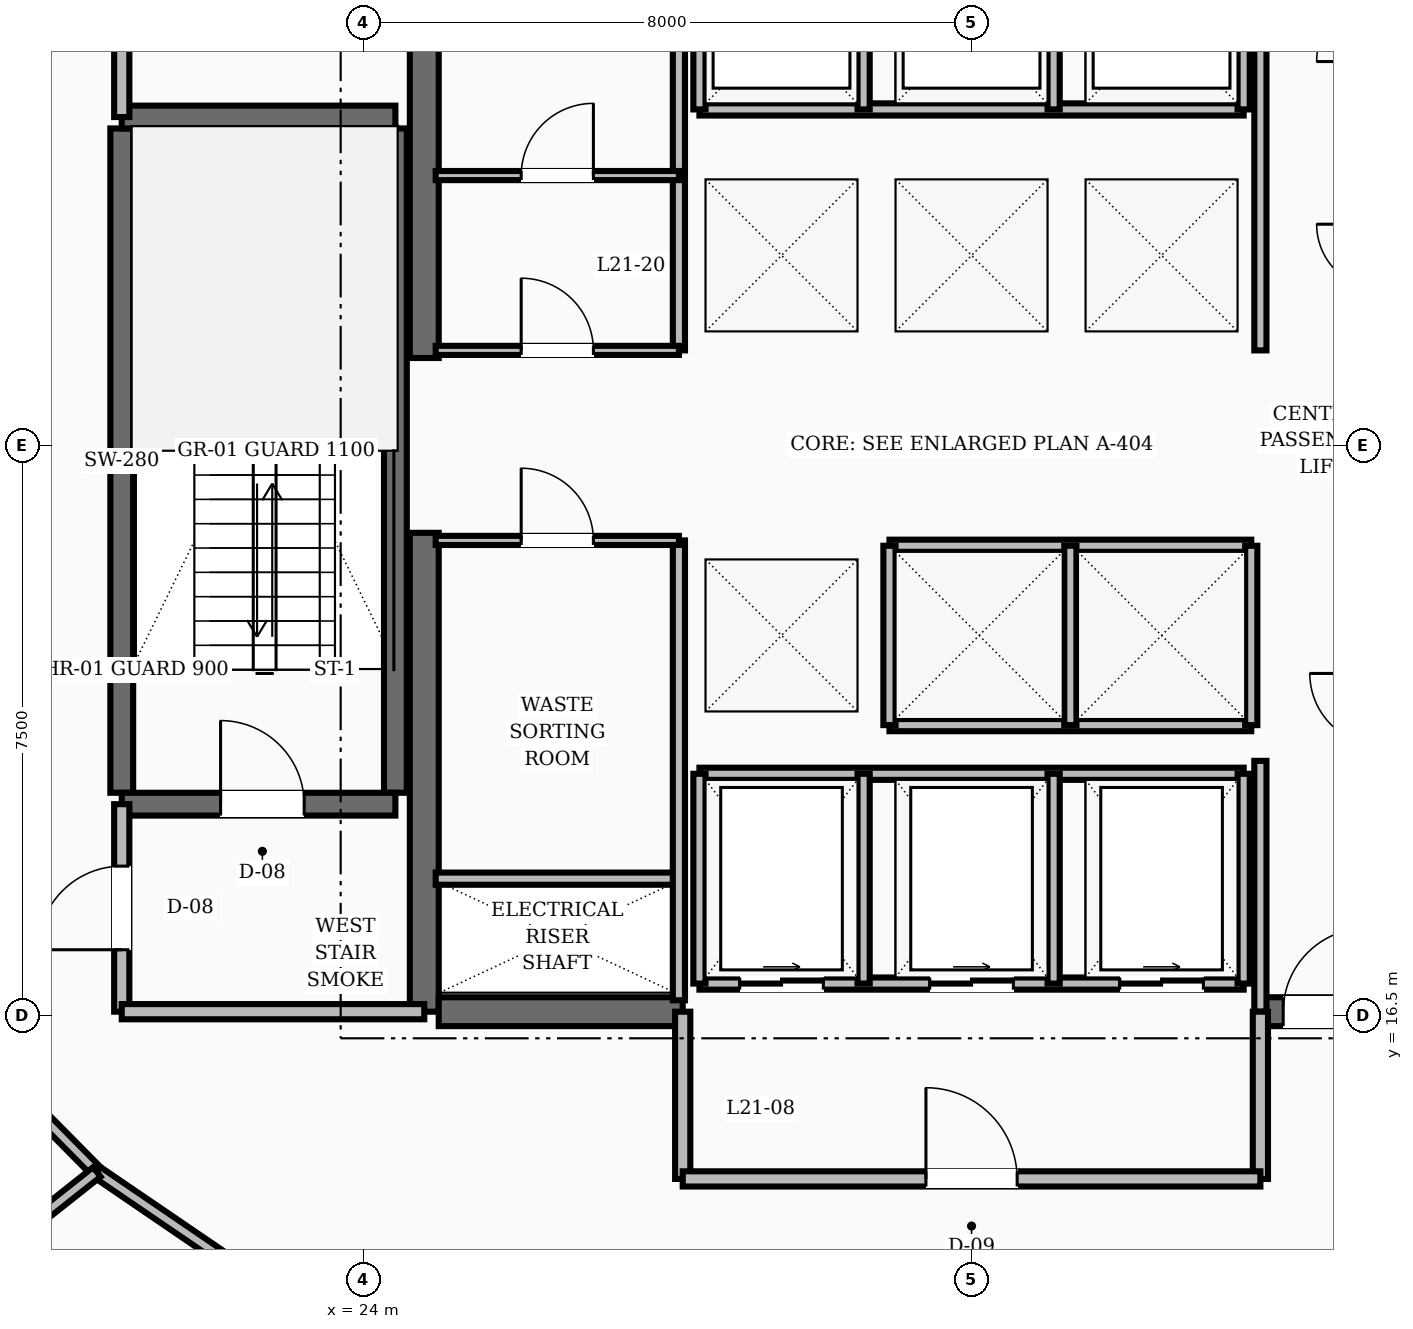
"""IFC4 building model, lengths in metres.
Left out: names, types, materials, properties, quantities, classifications, styles, units other than length and angle.
Written with IfcOpenShell. Run it as: python <this file> out.ifc"""

import sys

from ifc_helpers import new_model, si_unit, direction, frame, frame_2d, origin, place, context, subcontext, project, spatial, rectangle, extrude, element, fill, save


model = new_model("IFC4")
c1 = context("Model", 3, precision=1e-05, world=origin(), true_north=direction((0.0, 1.0)))
c2 = subcontext(c1, "Body", "Model", "MODEL_VIEW")
j1 = project(units=[si_unit("LENGTHUNIT", "METRE"), si_unit("PLANEANGLEUNIT", "RADIAN")], contexts=[c1])
p1 = place(None, origin())
s1 = spatial("IfcSite", under=j1, at=p1, CompositionType="ELEMENT")
p2 = place(p1, origin())
s2 = spatial("IfcBuilding", under=s1, at=p2, CompositionType="ELEMENT")
p3 = place(p2, frame((0.0, 0.0, 84.4)))
s3 = spatial("IfcBuildingStorey", under=s2, at=p3, CompositionType="ELEMENT", Elevation=84.4)
for number, where, z_axis, x_axis in (
    (1, (24.8, 16.55, 0.0), (0.0, 0.0, 1.0), (0.0, 1.0, 0.0)),
    (2, (24.8, 25.15, 0.0), (0.0, 0.0, 1.0), (0.0, 1.0, 0.0)),
):
    element("IfcWall", number, at=place(p3, frame(where, z_axis=z_axis, x_axis=x_axis)), inside=s3, PredefinedType="SHEAR", context=c2, shape_type="SweptSolid", body=[
        extrude(rectangle(XDim=6.3, YDim=0.38, at=frame_2d((3.15, 0.0))), origin(), (0.0, 0.0, 1.0), 3.6),
    ])
p4 = place(p3, frame((24.99, 16.55, 0.0), z_axis=(0.0, 0.0, 1.0), x_axis=(1.0, 0.0, 0.0)))
e3 = element("IfcWall", 3, at=p4, inside=s3, PredefinedType="SHEAR", context=c2, shape_type="SweptSolid", body=[
    extrude(rectangle(XDim=3.21, YDim=0.38, at=frame_2d((1.605, 0.0))), origin(), (0.0, 0.0, 1.0), 3.6),
])
p5 = place(p3, frame((35.8, 16.55, 0.0), z_axis=(0.0, 0.0, 1.0), x_axis=(1.0, 0.0, 0.0)))
e4 = element("IfcWall", 4, at=p5, inside=s3, PredefinedType="SHEAR", context=c2, shape_type="SweptSolid", body=[
    extrude(rectangle(XDim=3.21, YDim=0.38, at=frame_2d((1.605, 0.0))), origin(), (0.0, 0.0, 1.0), 3.6),
])
p6 = place(p5, frame((0.3, 0.0, 0.0)))
e5 = element("IfcOpeningElement", 5, at=p6, cuts=e4, PredefinedType="OPENING", context=c2, shape_type="SweptSolid", body=[
    extrude(rectangle(XDim=1.1, YDim=2.1, at=frame_2d((0.55, 1.05))), frame((0.0, 0.2, 0.0), z_axis=(0.0, -1.0, 0.0), x_axis=(1.0, 0.0, 0.0)), (0.0, 0.0, 1.0), 0.4),
])
for number, where, z_axis, x_axis in (
    (6, (20.82, 19.43, 0.0), (0.0, 0.0, 1.0), (0.0, 1.0, 0.0)),
    (7, (24.42, 19.43, 0.0), (0.0, 0.0, 1.0), (0.0, 1.0, 0.0)),
):
    element("IfcWall", number, at=place(p3, frame(where, z_axis=z_axis, x_axis=x_axis)), inside=s3, PredefinedType="SHEAR", context=c2, shape_type="SweptSolid", body=[
        extrude(rectangle(XDim=8.74, YDim=0.3, at=frame_2d((4.37, 0.0))), origin(), (0.0, 0.0, 1.0), 3.6),
    ])
p7 = place(p3, frame((20.82, 19.28, 0.0), z_axis=(0.0, 0.0, 1.0), x_axis=(1.0, 0.0, 0.0)))
e8 = element("IfcWall", 8, at=p7, inside=s3, PredefinedType="SHEAR", context=c2, shape_type="SweptSolid", body=[
    extrude(rectangle(XDim=3.6, YDim=0.3, at=frame_2d((1.8, 0.0))), origin(), (0.0, 0.0, 1.0), 3.6),
])
p8 = place(p7, frame((1.3, 0.0, 0.0)))
e9 = element("IfcOpeningElement", 9, at=p8, cuts=e8, PredefinedType="OPENING", context=c2, shape_type="SweptSolid", body=[
    extrude(rectangle(XDim=1.1, YDim=2.1, at=frame_2d((0.55, 1.05))), frame((0.0, 0.16, 0.0), z_axis=(0.0, -1.0, 0.0), x_axis=(1.0, 0.0, 0.0)), (0.0, 0.0, 1.0), 0.32),
])
p9 = place(p3, frame((20.82, 28.32, 0.0), z_axis=(0.0, 0.0, 1.0), x_axis=(1.0, 0.0, 0.0)))
e10 = element("IfcWall", 10, at=p9, inside=s3, PredefinedType="SHEAR", context=c2, shape_type="SweptSolid", body=[
    extrude(rectangle(XDim=3.6, YDim=0.3, at=frame_2d((1.8, 0.0))), origin(), (0.0, 0.0, 1.0), 3.6),
])
p10 = place(p3, frame((20.82, 16.55, 0.0), z_axis=(0.0, 0.0, 1.0), x_axis=(0.0, 1.0, 0.0)))
e11 = element("IfcWall", 11, at=p10, inside=s3, PredefinedType="SOLIDWALL", context=c2, shape_type="SweptSolid", body=[
    extrude(rectangle(XDim=2.73, YDim=0.2, at=frame_2d((1.365, 0.0))), origin(), (0.0, 0.0, 1.0), 2.71),
])
p11 = place(p10, frame((0.815, 0.0, 0.0)))
e12 = element("IfcOpeningElement", 12, at=p11, cuts=e11, PredefinedType="OPENING", context=c2, shape_type="SweptSolid", body=[
    extrude(rectangle(XDim=1.1, YDim=2.1, at=frame_2d((0.55, 1.05))), frame((0.0, 0.11, 0.0), z_axis=(0.0, -1.0, 0.0), x_axis=(1.0, 0.0, 0.0)), (0.0, 0.0, 1.0), 0.22),
])
p12 = place(p3, frame((20.82, 16.55, 0.0), z_axis=(0.0, 0.0, 1.0), x_axis=(1.0, 0.0, 0.0)))
e13 = element("IfcWall", 13, at=p12, inside=s3, PredefinedType="SOLIDWALL", context=c2, shape_type="SweptSolid", body=[
    extrude(rectangle(XDim=3.98, YDim=0.2, at=frame_2d((1.99, 0.0))), origin(), (0.0, 0.0, 1.0), 2.71),
])
p13 = place(p3, frame((20.82, 28.32, 0.0), z_axis=(0.0, 0.0, 1.0), x_axis=(0.0, 1.0, 0.0)))
e14 = element("IfcWall", 14, at=p13, inside=s3, PredefinedType="SOLIDWALL", context=c2, shape_type="SweptSolid", body=[
    extrude(rectangle(XDim=3.13, YDim=0.2, at=frame_2d((1.565, 0.0))), origin(), (0.0, 0.0, 1.0), 2.71),
])
p14 = place(p13, frame((1.09, 0.0, 0.0)))
e15 = element("IfcOpeningElement", 15, at=p14, cuts=e14, PredefinedType="OPENING", context=c2, shape_type="SweptSolid", body=[
    extrude(rectangle(XDim=0.95, YDim=2.1, at=frame_2d((0.475, 1.05))), frame((0.0, 0.11, 0.0), z_axis=(0.0, -1.0, 0.0), x_axis=(1.0, 0.0, 0.0)), (0.0, 0.0, 1.0), 0.22),
])
p15 = place(p3, frame((35.8, 16.55, 0.0), z_axis=(0.0, 0.0, 1.0), x_axis=(0.0, 1.0, 0.0)))
e16 = element("IfcWall", 16, at=p15, inside=s3, PredefinedType="SOLIDWALL", context=c2, shape_type="SweptSolid", body=[
    extrude(rectangle(XDim=3.3, YDim=0.16, at=frame_2d((1.65, 0.0))), origin(), (0.0, 0.0, 1.0), 2.71),
])
p16 = place(p3, frame((35.8, 25.25, 0.0), z_axis=(0.0, 0.0, 1.0), x_axis=(0.0, 1.0, 0.0)))
e17 = element("IfcWall", 17, at=p16, inside=s3, PredefinedType="SOLIDWALL", context=c2, shape_type="SweptSolid", body=[
    extrude(rectangle(XDim=6.2, YDim=0.16, at=frame_2d((3.1, 0.0))), origin(), (0.0, 0.0, 1.0), 2.71),
])
for number, where, z_axis, x_axis in (
    (18, (28.2, 14.35, 0.0), (0.0, 0.0, 1.0), (0.0, 1.0, 0.0)),
    (19, (35.8, 14.35, 0.0), (0.0, 0.0, 1.0), (0.0, 1.0, 0.0)),
):
    element("IfcWall", number, at=place(p3, frame(where, z_axis=z_axis, x_axis=x_axis)), inside=s3, PredefinedType="SOLIDWALL", context=c2, shape_type="SweptSolid", body=[
        extrude(rectangle(XDim=2.2, YDim=0.2, at=frame_2d((1.1, 0.0))), origin(), (0.0, 0.0, 1.0), 2.71),
    ])
p17 = place(p3, frame((28.2, 14.35, 0.0), z_axis=(0.0, 0.0, 1.0), x_axis=(1.0, 0.0, 0.0)))
e20 = element("IfcWall", 20, at=p17, inside=s3, PredefinedType="SOLIDWALL", context=c2, shape_type="SweptSolid", body=[
    extrude(rectangle(XDim=7.6, YDim=0.2, at=frame_2d((3.8, 0.0))), origin(), (0.0, 0.0, 1.0), 2.71),
])
p18 = place(p17, frame((3.2, 0.0, 0.0)))
e21 = element("IfcOpeningElement", 21, at=p18, cuts=e20, PredefinedType="OPENING", context=c2, shape_type="SweptSolid", body=[
    extrude(rectangle(XDim=1.2, YDim=2.1, at=frame_2d((0.6, 1.05))), frame((0.0, 0.11, 0.0), z_axis=(0.0, -1.0, 0.0), x_axis=(1.0, 0.0, 0.0)), (0.0, 0.0, 1.0), 0.22),
])
p19 = place(p3, frame((28.42, 28.42, 0.0), z_axis=(0.0, 0.0, 1.0), x_axis=(1.0, 0.0, 0.0)))
e22 = element("IfcWall", 22, at=p19, inside=s3, PredefinedType="SOLIDWALL", context=c2, shape_type="SweptSolid", body=[
    extrude(rectangle(XDim=7.16, YDim=0.16, at=frame_2d((3.58, 0.0))), origin(), (0.0, 0.0, 1.0), 2.71),
])
for number, where, z_axis, x_axis in (
    (23, (28.42, 28.42, 0.0), (0.0, 0.0, 1.0), (0.0, 1.0, 0.0)),
    (24, (30.58, 28.42, 0.0), (0.0, 0.0, 1.0), (0.0, 1.0, 0.0)),
    (25, (33.08, 28.42, 0.0), (0.0, 0.0, 1.0), (0.0, 1.0, 0.0)),
    (26, (35.58, 28.42, 0.0), (0.0, 0.0, 1.0), (0.0, 1.0, 0.0)),
):
    element("IfcWall", number, at=place(p3, frame(where, z_axis=z_axis, x_axis=x_axis)), inside=s3, PredefinedType="SOLIDWALL", context=c2, shape_type="SweptSolid", body=[
        extrude(rectangle(XDim=2.16, YDim=0.16, at=frame_2d((1.08, 0.0))), origin(), (0.0, 0.0, 1.0), 2.71),
    ])
for number, where, z_axis, x_axis in (
    (27, (30.92, 22.68, 0.0), (0.0, 0.0, 1.0), (1.0, 0.0, 0.0)),
    (28, (30.92, 20.32, 0.0), (0.0, 0.0, 1.0), (1.0, 0.0, 0.0)),
):
    element("IfcWall", number, at=place(p3, frame(where, z_axis=z_axis, x_axis=x_axis)), inside=s3, PredefinedType="SOLIDWALL", context=c2, shape_type="SweptSolid", body=[
        extrude(rectangle(XDim=4.76, YDim=0.16, at=frame_2d((2.38, 0.0))), origin(), (0.0, 0.0, 1.0), 2.71),
    ])
for number, where, z_axis, x_axis in (
    (29, (30.92, 20.32, 0.0), (0.0, 0.0, 1.0), (0.0, 1.0, 0.0)),
    (30, (33.3, 20.32, 0.0), (0.0, 0.0, 1.0), (0.0, 1.0, 0.0)),
    (31, (35.68, 20.32, 0.0), (0.0, 0.0, 1.0), (0.0, 1.0, 0.0)),
):
    element("IfcWall", number, at=place(p3, frame(where, z_axis=z_axis, x_axis=x_axis)), inside=s3, PredefinedType="SOLIDWALL", context=c2, shape_type="SweptSolid", body=[
        extrude(rectangle(XDim=2.36, YDim=0.16, at=frame_2d((1.18, 0.0))), origin(), (0.0, 0.0, 1.0), 2.71),
    ])
p20 = place(p3, frame((28.42, 16.92, 0.0), z_axis=(0.0, 0.0, 1.0), x_axis=(1.0, 0.0, 0.0)))
e32 = element("IfcWall", 32, at=p20, inside=s3, PredefinedType="SOLIDWALL", context=c2, shape_type="SweptSolid", body=[
    extrude(rectangle(XDim=7.16, YDim=0.16, at=frame_2d((3.58, 0.0))), origin(), (0.0, 0.0, 1.0), 2.71),
])
p21 = place(p20, frame((0.53, 0.0, 0.0)))
e33 = element("IfcOpeningElement", 33, at=p21, cuts=e32, PredefinedType="OPENING", context=c2, shape_type="SweptSolid", body=[
    extrude(rectangle(XDim=1.1, YDim=2.15, at=frame_2d((0.55, 1.075))), frame((0.0, 0.09, 0.0), z_axis=(0.0, -1.0, 0.0), x_axis=(1.0, 0.0, 0.0)), (0.0, 0.0, 1.0), 0.18),
])
p22 = place(p20, frame((3.03, 0.0, 0.0)))
e34 = element("IfcOpeningElement", 34, at=p22, cuts=e32, PredefinedType="OPENING", context=c2, shape_type="SweptSolid", body=[
    extrude(rectangle(XDim=1.1, YDim=2.15, at=frame_2d((0.55, 1.075))), frame((0.0, 0.09, 0.0), z_axis=(0.0, -1.0, 0.0), x_axis=(1.0, 0.0, 0.0)), (0.0, 0.0, 1.0), 0.18),
])
p23 = place(p20, frame((5.53, 0.0, 0.0)))
e35 = element("IfcOpeningElement", 35, at=p23, cuts=e32, PredefinedType="OPENING", context=c2, shape_type="SweptSolid", body=[
    extrude(rectangle(XDim=1.1, YDim=2.15, at=frame_2d((0.55, 1.075))), frame((0.0, 0.09, 0.0), z_axis=(0.0, -1.0, 0.0), x_axis=(1.0, 0.0, 0.0)), (0.0, 0.0, 1.0), 0.18),
])
p24 = place(p3, frame((28.42, 19.68, 0.0), z_axis=(0.0, 0.0, 1.0), x_axis=(1.0, 0.0, 0.0)))
e36 = element("IfcWall", 36, at=p24, inside=s3, PredefinedType="SOLIDWALL", context=c2, shape_type="SweptSolid", body=[
    extrude(rectangle(XDim=7.16, YDim=0.16, at=frame_2d((3.58, 0.0))), origin(), (0.0, 0.0, 1.0), 2.71),
])
for number, where, z_axis, x_axis in (
    (37, (28.42, 16.92, 0.0), (0.0, 0.0, 1.0), (0.0, 1.0, 0.0)),
    (38, (30.58, 16.92, 0.0), (0.0, 0.0, 1.0), (0.0, 1.0, 0.0)),
    (39, (33.08, 16.92, 0.0), (0.0, 0.0, 1.0), (0.0, 1.0, 0.0)),
    (40, (35.58, 16.92, 0.0), (0.0, 0.0, 1.0), (0.0, 1.0, 0.0)),
):
    element("IfcWall", number, at=place(p3, frame(where, z_axis=z_axis, x_axis=x_axis)), inside=s3, PredefinedType="SOLIDWALL", context=c2, shape_type="SweptSolid", body=[
        extrude(rectangle(XDim=2.76, YDim=0.16, at=frame_2d((1.38, 0.0))), origin(), (0.0, 0.0, 1.0), 2.71),
    ])
p25 = place(p3, frame((24.95, 18.3, 0.0), z_axis=(0.0, 0.0, 1.0), x_axis=(1.0, 0.0, 0.0)))
e41 = element("IfcWall", 41, at=p25, inside=s3, PredefinedType="SOLIDWALL", context=c2, shape_type="SweptSolid", body=[
    extrude(rectangle(XDim=3.2, YDim=0.16, at=frame_2d((1.6, 0.0))), origin(), (0.0, 0.0, 1.0), 2.71),
])
p26 = place(p3, frame((28.15, 16.7, 0.0), z_axis=(0.0, 0.0, 1.0), x_axis=(0.0, 1.0, 0.0)))
e42 = element("IfcWall", 42, at=p26, inside=s3, PredefinedType="SOLIDWALL", context=c2, shape_type="SweptSolid", body=[
    extrude(rectangle(XDim=6.05, YDim=0.16, at=frame_2d((3.025, 0.0))), origin(), (0.0, 0.0, 1.0), 2.71),
])
p27 = place(p3, frame((28.15, 25.25, 0.0), z_axis=(0.0, 0.0, 1.0), x_axis=(0.0, 1.0, 0.0)))
e43 = element("IfcWall", 43, at=p27, inside=s3, PredefinedType="SOLIDWALL", context=c2, shape_type="SweptSolid", body=[
    extrude(rectangle(XDim=6.1, YDim=0.16, at=frame_2d((3.05, 0.0))), origin(), (0.0, 0.0, 1.0), 2.71),
])
p28 = place(p3, frame((24.95, 25.25, 0.0), z_axis=(0.0, 0.0, 1.0), x_axis=(1.0, 0.0, 0.0)))
e44 = element("IfcWall", 44, at=p28, inside=s3, PredefinedType="PARTITIONING", context=c2, shape_type="SweptSolid", body=[
    extrude(rectangle(XDim=3.2, YDim=0.12, at=frame_2d((1.6, 0.0))), origin(), (0.0, 0.0, 1.0), 2.71),
])
p29 = place(p28, frame((1.125, 0.0, 0.0)))
e45 = element("IfcOpeningElement", 45, at=p29, cuts=e44, PredefinedType="OPENING", context=c2, shape_type="SweptSolid", body=[
    extrude(rectangle(XDim=0.95, YDim=2.1, at=frame_2d((0.475, 1.05))), frame((0.0, 0.07, 0.0), z_axis=(0.0, -1.0, 0.0), x_axis=(1.0, 0.0, 0.0)), (0.0, 0.0, 1.0), 0.14),
])
p30 = place(p3, frame((24.95, 22.75, 0.0), z_axis=(0.0, 0.0, 1.0), x_axis=(1.0, 0.0, 0.0)))
e46 = element("IfcWall", 46, at=p30, inside=s3, PredefinedType="PARTITIONING", context=c2, shape_type="SweptSolid", body=[
    extrude(rectangle(XDim=3.2, YDim=0.12, at=frame_2d((1.6, 0.0))), origin(), (0.0, 0.0, 1.0), 2.71),
])
p31 = place(p30, frame((1.125, 0.0, 0.0)))
e47 = element("IfcOpeningElement", 47, at=p31, cuts=e46, PredefinedType="OPENING", context=c2, shape_type="SweptSolid", body=[
    extrude(rectangle(XDim=0.95, YDim=2.1, at=frame_2d((0.475, 1.05))), frame((0.0, 0.07, 0.0), z_axis=(0.0, -1.0, 0.0), x_axis=(1.0, 0.0, 0.0)), (0.0, 0.0, 1.0), 0.14),
])
p32 = place(p3, frame((24.95, 27.55, 0.0), z_axis=(0.0, 0.0, 1.0), x_axis=(1.0, 0.0, 0.0)))
e48 = element("IfcWall", 48, at=p32, inside=s3, PredefinedType="PARTITIONING", context=c2, shape_type="SweptSolid", body=[
    extrude(rectangle(XDim=3.2, YDim=0.12, at=frame_2d((1.6, 0.0))), origin(), (0.0, 0.0, 1.0), 2.71),
])
p33 = place(p32, frame((1.125, 0.0, 0.0)))
e49 = element("IfcOpeningElement", 49, at=p33, cuts=e48, PredefinedType="OPENING", context=c2, shape_type="SweptSolid", body=[
    extrude(rectangle(XDim=0.95, YDim=2.1, at=frame_2d((0.475, 1.05))), frame((0.0, 0.07, 0.0), z_axis=(0.0, -1.0, 0.0), x_axis=(1.0, 0.0, 0.0)), (0.0, 0.0, 1.0), 0.14),
])
p34 = place(p3, frame((18.469, 16.49, 0.0), z_axis=(0.0, 0.0, 1.0), x_axis=(0.702811997, -0.711375636969, 0.0)))
e50 = element("IfcWall", 50, at=p34, inside=s3, PredefinedType="SOLIDWALL", context=c2, shape_type="SweptSolid", body=[
    extrude(rectangle(XDim=2.879, YDim=0.16, at=frame_2d((1.44, 0.0))), origin(), (0.0, 0.0, 1.0), 2.71),
])
p35 = place(p3, frame((20.492, 14.441, 0.0), z_axis=(0.0, 0.0, 1.0), x_axis=(0.826293096206, -0.56324037423, 0.0)))
e51 = element("IfcWall", 51, at=p35, inside=s3, PredefinedType="SOLIDWALL", context=c2, shape_type="SweptSolid", body=[
    extrude(rectangle(XDim=2.985, YDim=0.16, at=frame_2d((1.492, 0.0))), origin(), (0.0, 0.0, 1.0), 2.71),
])
p36 = place(p3, frame((20.492, 14.441, 0.0), z_axis=(0.0, 0.0, 1.0), x_axis=(-0.784008851618, -0.620749644047, 0.0)))
e52 = element("IfcWall", 52, at=p36, inside=s3, PredefinedType="SOLIDWALL", context=c2, shape_type="SweptSolid", body=[
    extrude(rectangle(XDim=9.641, YDim=0.16, at=frame_2d((4.82, 0.0))), origin(), (0.0, 0.0, 1.0), 2.71),
])
p37 = place(p8, origin())
e53 = element("IfcDoor", 53, at=p37, inside=s3, OperationType="SINGLE_SWING_LEFT", PredefinedType="DOOR", context=c2, shape_type="SweptSolid", body=[
    extrude(rectangle(XDim=1.1, YDim=2.1, at=frame_2d((0.55, 1.05))), frame((0.0, 0.025, 0.0), z_axis=(0.0, -1.0, 0.0), x_axis=(1.0, 0.0, 0.0)), (0.0, 0.0, 1.0), 0.05),
])
fill(e9, e53)
p38 = place(p11, origin())
e54 = element("IfcDoor", 54, at=p38, inside=s3, OperationType="SINGLE_SWING_LEFT", PredefinedType="DOOR", context=c2, shape_type="SweptSolid", body=[
    extrude(rectangle(XDim=1.1, YDim=2.1, at=frame_2d((0.55, 1.05))), frame((0.0, 0.025, 0.0), z_axis=(0.0, -1.0, 0.0), x_axis=(1.0, 0.0, 0.0)), (0.0, 0.0, 1.0), 0.05),
])
fill(e12, e54)
p39 = place(p6, origin())
e55 = element("IfcDoor", 55, at=p39, inside=s3, OperationType="SINGLE_SWING_RIGHT", PredefinedType="DOOR", context=c2, shape_type="SweptSolid", body=[
    extrude(rectangle(XDim=1.1, YDim=2.1, at=frame_2d((0.55, 1.05))), frame((0.0, 0.025, 0.0), z_axis=(0.0, -1.0, 0.0), x_axis=(1.0, 0.0, 0.0)), (0.0, 0.0, 1.0), 0.05),
])
fill(e5, e55)
p40 = place(p18, origin())
e56 = element("IfcDoor", 56, at=p40, inside=s3, OperationType="SINGLE_SWING_LEFT", PredefinedType="DOOR", context=c2, shape_type="SweptSolid", body=[
    extrude(rectangle(XDim=1.2, YDim=2.1, at=frame_2d((0.6, 1.05))), frame((0.0, 0.025, 0.0), z_axis=(0.0, -1.0, 0.0), x_axis=(1.0, 0.0, 0.0)), (0.0, 0.0, 1.0), 0.05),
])
fill(e21, e56)
p41 = place(p21, origin())
e57 = element("IfcDoor", 57, at=p41, inside=s3, OperationType="SLIDING_TO_RIGHT", PredefinedType="DOOR", context=c2, shape_type="SweptSolid", body=[
    extrude(rectangle(XDim=1.1, YDim=2.15, at=frame_2d((0.55, 1.075))), frame((0.0, 0.025, 0.0), z_axis=(0.0, -1.0, 0.0), x_axis=(1.0, 0.0, 0.0)), (0.0, 0.0, 1.0), 0.05),
])
fill(e33, e57)
p42 = place(p22, origin())
e58 = element("IfcDoor", 58, at=p42, inside=s3, OperationType="SLIDING_TO_RIGHT", PredefinedType="DOOR", context=c2, shape_type="SweptSolid", body=[
    extrude(rectangle(XDim=1.1, YDim=2.15, at=frame_2d((0.55, 1.075))), frame((0.0, 0.025, 0.0), z_axis=(0.0, -1.0, 0.0), x_axis=(1.0, 0.0, 0.0)), (0.0, 0.0, 1.0), 0.05),
])
fill(e34, e58)
p43 = place(p23, origin())
e59 = element("IfcDoor", 59, at=p43, inside=s3, OperationType="SLIDING_TO_RIGHT", PredefinedType="DOOR", context=c2, shape_type="SweptSolid", body=[
    extrude(rectangle(XDim=1.1, YDim=2.15, at=frame_2d((0.55, 1.075))), frame((0.0, 0.025, 0.0), z_axis=(0.0, -1.0, 0.0), x_axis=(1.0, 0.0, 0.0)), (0.0, 0.0, 1.0), 0.05),
])
fill(e35, e59)
p44 = place(p29, origin())
e60 = element("IfcDoor", 60, at=p44, inside=s3, OperationType="SINGLE_SWING_LEFT", PredefinedType="DOOR", context=c2, shape_type="SweptSolid", body=[
    extrude(rectangle(XDim=0.95, YDim=2.1, at=frame_2d((0.475, 1.05))), frame((0.0, 0.025, 0.0), z_axis=(0.0, -1.0, 0.0), x_axis=(1.0, 0.0, 0.0)), (0.0, 0.0, 1.0), 0.05),
])
fill(e45, e60)
p45 = place(p33, origin())
e61 = element("IfcDoor", 61, at=p45, inside=s3, OperationType="SINGLE_SWING_RIGHT", PredefinedType="DOOR", context=c2, shape_type="SweptSolid", body=[
    extrude(rectangle(XDim=0.95, YDim=2.1, at=frame_2d((0.475, 1.05))), frame((0.0, 0.025, 0.0), z_axis=(0.0, -1.0, 0.0), x_axis=(1.0, 0.0, 0.0)), (0.0, 0.0, 1.0), 0.05),
])
fill(e49, e61)
p46 = place(p31, origin())
e62 = element("IfcDoor", 62, at=p46, inside=s3, OperationType="SINGLE_SWING_LEFT", PredefinedType="DOOR", context=c2, shape_type="SweptSolid", body=[
    extrude(rectangle(XDim=0.95, YDim=2.1, at=frame_2d((0.475, 1.05))), frame((0.0, 0.025, 0.0), z_axis=(0.0, -1.0, 0.0), x_axis=(1.0, 0.0, 0.0)), (0.0, 0.0, 1.0), 0.05),
])
fill(e47, e62)
save(model, sys.argv[1])
